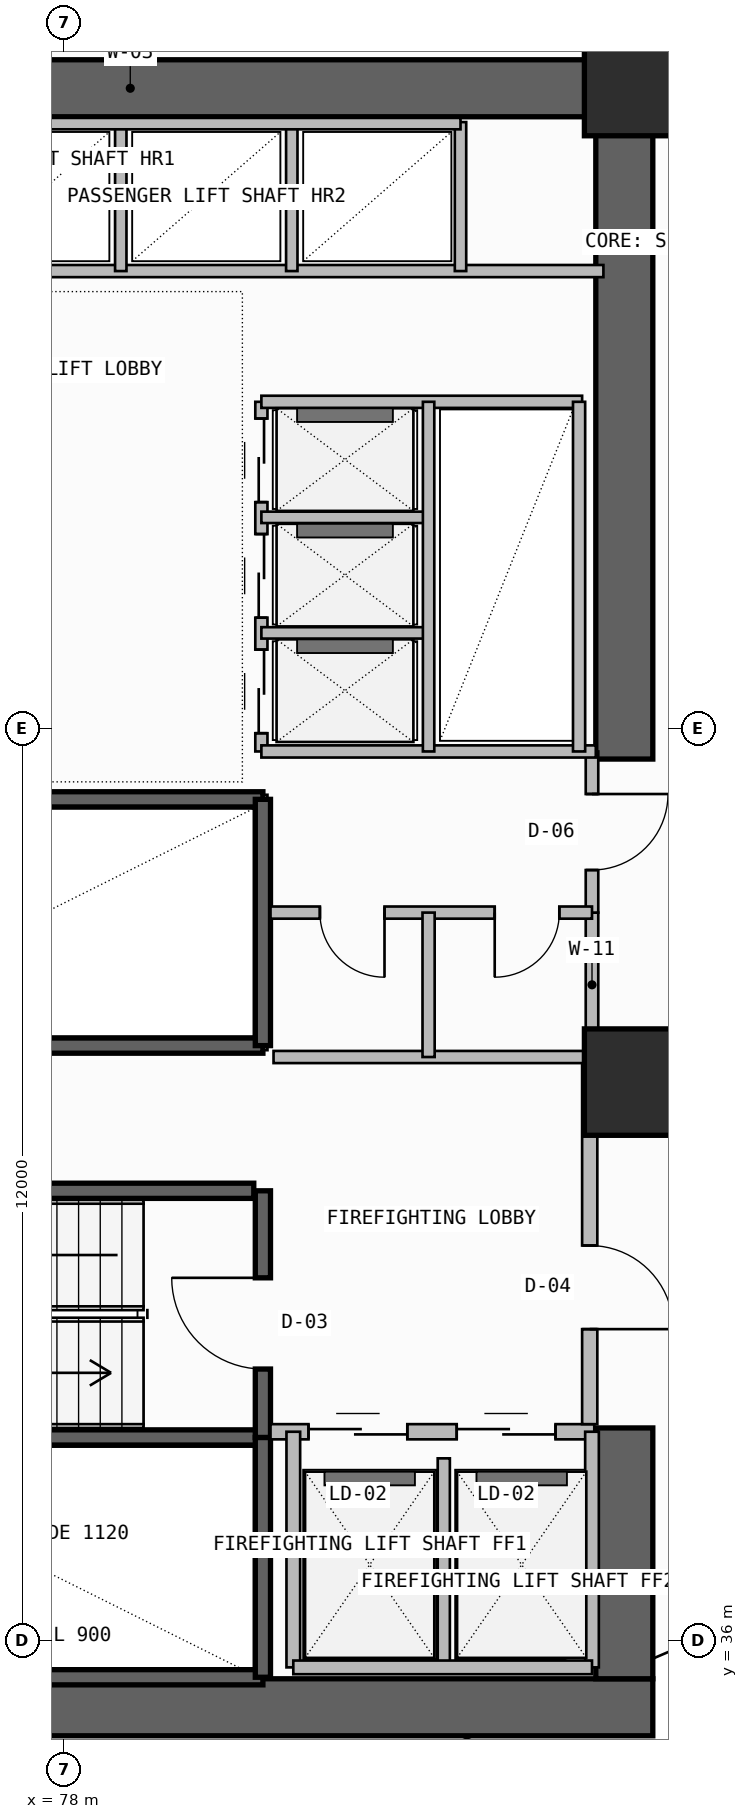
"""IFC4 building model, lengths in metres.
Left out: names, types, materials, properties, quantities, classifications, styles, units other than length and angle.
Written with IfcOpenShell. Run it as: python <this file> out.ifc"""

import sys

from ifc_helpers import new_model, si_unit, direction, frame, frame_2d, origin, origin_2d, place, context, subcontext, project, spatial, rectangle, extrude, element, fill, save


model = new_model("IFC4")
c1 = context("Model", 3, precision=1e-05, world=origin(), true_north=direction((0.0, 1.0)))
c2 = subcontext(c1, "Body", "Model", "MODEL_VIEW")
j1 = project(units=[si_unit("LENGTHUNIT", "METRE"), si_unit("PLANEANGLEUNIT", "RADIAN")], contexts=[c1])
p1 = place(None, origin())
s1 = spatial("IfcSite", under=j1, at=p1, CompositionType="ELEMENT")
p2 = place(p1, origin())
s2 = spatial("IfcBuilding", under=s1, at=p2, CompositionType="ELEMENT")
p3 = place(p2, frame((0.0, 0.0, 175.5)))
s3 = spatial("IfcBuildingStorey", under=s2, at=p3, CompositionType="ELEMENT", Elevation=175.5)
p4 = place(p3, frame((72.15, 35.125, -0.26), z_axis=(0.0, 0.0, 1.0), x_axis=(1.0, 0.0, 0.0)))
e1 = element("IfcWall", 1, at=p4, inside=s3, PredefinedType="SHEAR", context=c2, shape_type="SweptSolid", body=[
    extrude(rectangle(XDim=13.6, YDim=0.75, at=frame_2d((6.8, 0.0))), origin(), (0.0, 0.0, 1.0), 3.6),
])
p5 = place(p3, frame((85.375, 35.5, -0.26), z_axis=(0.0, 0.0, 1.0), x_axis=(0.0, 1.0, 0.0)))
e2 = element("IfcWall", 2, at=p5, inside=s3, PredefinedType="SHEAR", context=c2, shape_type="SweptSolid", body=[
    extrude(rectangle(XDim=3.3, YDim=0.75, at=frame_2d((1.65, 0.0))), origin(), (0.0, 0.0, 1.0), 3.6),
])
p6 = place(p3, frame((72.0, 56.425, -0.26), z_axis=(0.0, 0.0, 1.0), x_axis=(1.0, 0.0, 0.0)))
e3 = element("IfcWall", 3, at=p6, inside=s3, PredefinedType="SHEAR", context=c2, shape_type="SweptSolid", body=[
    extrude(rectangle(XDim=13.75, YDim=0.75, at=frame_2d((6.875, 0.0))), origin(), (0.0, 0.0, 1.0), 3.6),
])
p7 = place(p3, frame((85.375, 47.6, -0.26), z_axis=(0.0, 0.0, 1.0), x_axis=(0.0, 1.0, 0.0)))
e4 = element("IfcWall", 4, at=p7, inside=s3, PredefinedType="SHEAR", context=c2, shape_type="SweptSolid", body=[
    extrude(rectangle(XDim=8.45, YDim=0.75, at=frame_2d((4.225, 0.0))), origin(), (0.0, 0.0, 1.0), 3.6),
])
for number, where, z_axis, x_axis in (
    (5, (85.55, 43.35, 0.0), (0.0, 0.0, 1.0), (1.0, 0.0, 0.0)),
    (6, (85.55, 56.5, 0.0), (0.0, 0.0, 1.0), (1.0, 0.0, 0.0)),
):
    element("IfcColumn", number, at=place(p3, frame(where, z_axis=z_axis, x_axis=x_axis)), inside=s3, PredefinedType="COLUMN", context=c2, shape_type="SweptSolid", body=[
        extrude(rectangle(XDim=1.4, YDim=1.4, at=origin_2d()), origin(), (0.0, 0.0, 1.0), 3.6),
    ])
for number, where, z_axis, x_axis in (
    (7, (72.92, 35.52, -0.26), (0.0, 0.0, 1.0), (1.0, 0.0, 0.0)),
    (8, (72.92, 38.675, -0.26), (0.0, 0.0, 1.0), (1.0, 0.0, 0.0)),
):
    element("IfcWall", number, at=place(p3, frame(where, z_axis=z_axis, x_axis=x_axis)), inside=s3, PredefinedType="SOLIDWALL", context=c2, shape_type="SweptSolid", body=[
        extrude(rectangle(XDim=7.7, YDim=0.2, at=frame_2d((3.85, 0.0))), origin(), (0.0, 0.0, 1.0), 3.6),
    ])
p8 = place(p3, frame((80.62, 35.52, -0.26), z_axis=(0.0, 0.0, 1.0), x_axis=(0.0, 1.0, 0.0)))
e9 = element("IfcWall", 9, at=p8, inside=s3, PredefinedType="SOLIDWALL", context=c2, shape_type="SweptSolid", body=[
    extrude(rectangle(XDim=3.155, YDim=0.2, at=frame_2d((1.578, 0.0))), origin(), (0.0, 0.0, 1.0), 3.6),
])
p9 = place(p3, frame((80.62, 38.675, -0.26), z_axis=(0.0, 0.0, 1.0), x_axis=(0.0, 1.0, 0.0)))
e10 = element("IfcWall", 10, at=p9, inside=s3, PredefinedType="SOLIDWALL", context=c2, shape_type="SweptSolid", body=[
    extrude(rectangle(XDim=3.245, YDim=0.2, at=frame_2d((1.623, 0.0))), origin(), (0.0, 0.0, 1.0), 3.6),
])
p10 = place(p9, frame((0.9, 0.0, 0.26)))
e11 = element("IfcOpeningElement", 11, at=p10, cuts=e10, PredefinedType="OPENING", context=c2, shape_type="SweptSolid", body=[
    extrude(rectangle(XDim=1.2, YDim=2.2, at=frame_2d((0.6, 1.1))), frame((0.0, 0.11, 0.0), z_axis=(0.0, -1.0, 0.0), x_axis=(1.0, 0.0, 0.0)), (0.0, 0.0, 1.0), 0.22),
])
p11 = place(p3, frame((80.72, 38.75, 0.0), z_axis=(0.0, 0.0, 1.0), x_axis=(1.0, 0.0, 0.0)))
e12 = element("IfcWall", 12, at=p11, inside=s3, PredefinedType="SOLIDWALL", context=c2, shape_type="SweptSolid", body=[
    extrude(rectangle(XDim=4.26, YDim=0.2, at=frame_2d((2.13, 0.0))), origin(), (0.0, 0.0, 1.0), 3.34),
])
p12 = place(p11, frame((0.5, 0.0, 0.0)))
e13 = element("IfcOpeningElement", 13, at=p12, cuts=e12, PredefinedType="OPENING", context=c2, shape_type="SweptSolid", body=[
    extrude(rectangle(XDim=1.3, YDim=2.3, at=frame_2d((0.65, 1.15))), frame((0.0, 0.11, 0.0), z_axis=(0.0, -1.0, 0.0), x_axis=(1.0, 0.0, 0.0)), (0.0, 0.0, 1.0), 0.22),
])
p13 = place(p11, frame((2.45, 0.0, 0.0)))
e14 = element("IfcOpeningElement", 14, at=p13, cuts=e12, PredefinedType="OPENING", context=c2, shape_type="SweptSolid", body=[
    extrude(rectangle(XDim=1.3, YDim=2.3, at=frame_2d((0.65, 1.15))), frame((0.0, 0.11, 0.0), z_axis=(0.0, -1.0, 0.0), x_axis=(1.0, 0.0, 0.0)), (0.0, 0.0, 1.0), 0.22),
])
p14 = place(p3, frame((83.0, 35.65, 0.0), z_axis=(0.0, 0.0, 1.0), x_axis=(0.0, 1.0, 0.0)))
e15 = element("IfcWall", 15, at=p14, inside=s3, PredefinedType="PLUMBINGWALL", context=c2, shape_type="SweptSolid", body=[
    extrude(rectangle(XDim=2.75, YDim=0.16, at=frame_2d((1.375, 0.0))), origin(), (0.0, 0.0, 1.0), 3.34),
])
for number, where, z_axis, x_axis in (
    (16, (84.95, 35.65, 0.0), (0.0, 0.0, 1.0), (0.0, 1.0, 0.0)),
    (17, (81.02, 35.65, 0.0), (0.0, 0.0, 1.0), (0.0, 1.0, 0.0)),
):
    element("IfcWall", number, at=place(p3, frame(where, z_axis=z_axis, x_axis=x_axis)), inside=s3, PredefinedType="SOLIDWALL", context=c2, shape_type="SweptSolid", body=[
        extrude(rectangle(XDim=3.1, YDim=0.18, at=frame_2d((1.55, 0.0))), origin(), (0.0, 0.0, 1.0), 3.34),
    ])
p15 = place(p3, frame((81.02, 35.65, 0.0), z_axis=(0.0, 0.0, 1.0), x_axis=(1.0, 0.0, 0.0)))
e18 = element("IfcWall", 18, at=p15, inside=s3, PredefinedType="SOLIDWALL", context=c2, shape_type="SweptSolid", body=[
    extrude(rectangle(XDim=3.93, YDim=0.18, at=frame_2d((1.965, 0.0))), origin(), (0.0, 0.0, 1.0), 3.34),
])
p16 = place(p3, frame((84.92, 38.85, 0.0), z_axis=(0.0, 0.0, 1.0), x_axis=(0.0, 1.0, 0.0)))
e19 = element("IfcWall", 19, at=p16, inside=s3, PredefinedType="SOLIDWALL", context=c2, shape_type="SweptSolid", body=[
    extrude(rectangle(XDim=4.83, YDim=0.2, at=frame_2d((2.415, 0.0))), origin(), (0.0, 0.0, 1.0), 3.34),
])
p17 = place(p16, frame((1.25, 0.0, 0.0)))
e20 = element("IfcOpeningElement", 20, at=p17, cuts=e19, PredefinedType="OPENING", context=c2, shape_type="SweptSolid", body=[
    extrude(rectangle(XDim=1.1, YDim=2.2, at=frame_2d((0.55, 1.1))), frame((0.0, 0.11, 0.0), z_axis=(0.0, -1.0, 0.0), x_axis=(1.0, 0.0, 0.0)), (0.0, 0.0, 1.0), 0.22),
])
p18 = place(p3, frame((72.92, 41.92, -0.26), z_axis=(0.0, 0.0, 1.0), x_axis=(1.0, 0.0, 0.0)))
e21 = element("IfcWall", 21, at=p18, inside=s3, PredefinedType="SOLIDWALL", context=c2, shape_type="SweptSolid", body=[
    extrude(rectangle(XDim=7.58, YDim=0.2, at=frame_2d((3.79, 0.0))), origin(), (0.0, 0.0, 1.0), 3.6),
])
for number, where, z_axis, x_axis in (
    (22, (72.92, 43.83, -0.26), (0.0, 0.0, 1.0), (1.0, 0.0, 0.0)),
    (23, (72.92, 47.07, -0.26), (0.0, 0.0, 1.0), (1.0, 0.0, 0.0)),
):
    element("IfcWall", number, at=place(p3, frame(where, z_axis=z_axis, x_axis=x_axis)), inside=s3, PredefinedType="SOLIDWALL", context=c2, shape_type="SweptSolid", body=[
        extrude(rectangle(XDim=7.7, YDim=0.2, at=frame_2d((3.85, 0.0))), origin(), (0.0, 0.0, 1.0), 3.6),
    ])
p19 = place(p3, frame((80.62, 43.83, -0.26), z_axis=(0.0, 0.0, 1.0), x_axis=(0.0, 1.0, 0.0)))
e24 = element("IfcWall", 24, at=p19, inside=s3, PredefinedType="SOLIDWALL", context=c2, shape_type="SweptSolid", body=[
    extrude(rectangle(XDim=3.24, YDim=0.2, at=frame_2d((1.62, 0.0))), origin(), (0.0, 0.0, 1.0), 3.6),
])
p20 = place(p3, frame((84.95, 43.68, 0.0), z_axis=(0.0, 0.0, 1.0), x_axis=(0.0, 1.0, 0.0)))
e25 = element("IfcWall", 25, at=p20, inside=s3, PredefinedType="PLUMBINGWALL", context=c2, shape_type="SweptSolid", body=[
    extrude(rectangle(XDim=1.9, YDim=0.165, at=frame_2d((0.95, 0.0))), origin(), (0.0, 0.0, 1.0), 3.34),
])
p21 = place(p3, frame((84.95, 45.58, 0.0), z_axis=(0.0, 0.0, 1.0), x_axis=(0.0, 1.0, 0.0)))
e26 = element("IfcWall", 26, at=p21, inside=s3, PredefinedType="PARTITIONING", context=c2, shape_type="SweptSolid", body=[
    extrude(rectangle(XDim=2.12, YDim=0.165, at=frame_2d((1.06, 0.0))), origin(), (0.0, 0.0, 1.0), 3.34),
])
p22 = place(p21, frame((0.56, 0.0, 0.0)))
e27 = element("IfcOpeningElement", 27, at=p22, cuts=e26, PredefinedType="OPENING", context=c2, shape_type="SweptSolid", body=[
    extrude(rectangle(XDim=1.0, YDim=2.2, at=frame_2d((0.5, 1.1))), frame((0.0, 0.093, 0.0), z_axis=(0.0, -1.0, 0.0), x_axis=(1.0, 0.0, 0.0)), (0.0, 0.0, 1.0), 0.185),
])
p23 = place(p3, frame((80.72, 45.58, 0.0), z_axis=(0.0, 0.0, 1.0), x_axis=(1.0, 0.0, 0.0)))
e28 = element("IfcWall", 28, at=p23, inside=s3, PredefinedType="PLUMBINGWALL", context=c2, shape_type="SweptSolid", body=[
    extrude(rectangle(XDim=4.23, YDim=0.16, at=frame_2d((2.115, 0.0))), origin(), (0.0, 0.0, 1.0), 3.34),
])
p24 = place(p23, frame((0.65, 0.0, 0.0)))
e29 = element("IfcOpeningElement", 29, at=p24, cuts=e28, PredefinedType="OPENING", context=c2, shape_type="SweptSolid", body=[
    extrude(rectangle(XDim=0.85, YDim=2.05, at=frame_2d((0.425, 1.025))), frame((0.0, 0.09, 0.0), z_axis=(0.0, -1.0, 0.0), x_axis=(1.0, 0.0, 0.0)), (0.0, 0.0, 1.0), 0.18),
])
p25 = place(p23, frame((2.95, 0.0, 0.0)))
e30 = element("IfcOpeningElement", 30, at=p25, cuts=e28, PredefinedType="OPENING", context=c2, shape_type="SweptSolid", body=[
    extrude(rectangle(XDim=0.85, YDim=2.05, at=frame_2d((0.425, 1.025))), frame((0.0, 0.09, 0.0), z_axis=(0.0, -1.0, 0.0), x_axis=(1.0, 0.0, 0.0)), (0.0, 0.0, 1.0), 0.18),
])
p26 = place(p3, frame((80.76, 43.68, 0.0), z_axis=(0.0, 0.0, 1.0), x_axis=(1.0, 0.0, 0.0)))
e31 = element("IfcWall", 31, at=p26, inside=s3, PredefinedType="PLUMBINGWALL", context=c2, shape_type="SweptSolid", body=[
    extrude(rectangle(XDim=4.19, YDim=0.16, at=frame_2d((2.095, 0.0))), origin(), (0.0, 0.0, 1.0), 3.34),
])
p27 = place(p3, frame((82.8, 43.68, 0.0), z_axis=(0.0, 0.0, 1.0), x_axis=(0.0, 1.0, 0.0)))
e32 = element("IfcWall", 32, at=p27, inside=s3, PredefinedType="PLUMBINGWALL", context=c2, shape_type="SweptSolid", body=[
    extrude(rectangle(XDim=1.9, YDim=0.16, at=frame_2d((0.95, 0.0))), origin(), (0.0, 0.0, 1.0), 3.34),
])
p28 = place(p3, frame((80.6, 47.7, 0.0), z_axis=(0.0, 0.0, 1.0), x_axis=(0.0, 1.0, 0.0)))
e33 = element("IfcWall", 33, at=p28, inside=s3, PredefinedType="SOLIDWALL", context=c2, shape_type="SweptSolid", body=[
    extrude(rectangle(XDim=4.6, YDim=0.16, at=frame_2d((2.3, 0.0))), origin(), (0.0, 0.0, 1.0), 3.34),
])
p29 = place(p28, frame((0.24, 0.0, 0.0)))
e34 = element("IfcOpeningElement", 34, at=p29, cuts=e33, PredefinedType="OPENING", context=c2, shape_type="SweptSolid", body=[
    extrude(rectangle(XDim=1.1, YDim=2.25, at=frame_2d((0.55, 1.125))), frame((0.0, 0.09, 0.0), z_axis=(0.0, -1.0, 0.0), x_axis=(1.0, 0.0, 0.0)), (0.0, 0.0, 1.0), 0.18),
])
p30 = place(p28, frame((1.76, 0.0, 0.0)))
e35 = element("IfcOpeningElement", 35, at=p30, cuts=e33, PredefinedType="OPENING", context=c2, shape_type="SweptSolid", body=[
    extrude(rectangle(XDim=1.1, YDim=2.25, at=frame_2d((0.55, 1.125))), frame((0.0, 0.09, 0.0), z_axis=(0.0, -1.0, 0.0), x_axis=(1.0, 0.0, 0.0)), (0.0, 0.0, 1.0), 0.18),
])
p31 = place(p28, frame((3.28, 0.0, 0.0)))
e36 = element("IfcOpeningElement", 36, at=p31, cuts=e33, PredefinedType="OPENING", context=c2, shape_type="SweptSolid", body=[
    extrude(rectangle(XDim=1.1, YDim=2.25, at=frame_2d((0.55, 1.125))), frame((0.0, 0.09, 0.0), z_axis=(0.0, -1.0, 0.0), x_axis=(1.0, 0.0, 0.0)), (0.0, 0.0, 1.0), 0.18),
])
p32 = place(p3, frame((80.6, 47.7, 0.0), z_axis=(0.0, 0.0, 1.0), x_axis=(1.0, 0.0, 0.0)))
e37 = element("IfcWall", 37, at=p32, inside=s3, PredefinedType="SOLIDWALL", context=c2, shape_type="SweptSolid", body=[
    extrude(rectangle(XDim=4.4, YDim=0.16, at=frame_2d((2.2, 0.0))), origin(), (0.0, 0.0, 1.0), 3.34),
])
p33 = place(p3, frame((80.6, 52.3, 0.0), z_axis=(0.0, 0.0, 1.0), x_axis=(1.0, 0.0, 0.0)))
e38 = element("IfcWall", 38, at=p33, inside=s3, PredefinedType="SOLIDWALL", context=c2, shape_type="SweptSolid", body=[
    extrude(rectangle(XDim=4.22, YDim=0.16, at=frame_2d((2.11, 0.0))), origin(), (0.0, 0.0, 1.0), 3.34),
])
for number, where, z_axis, x_axis in (
    (39, (80.6, 49.26, 0.0), (0.0, 0.0, 1.0), (1.0, 0.0, 0.0)),
    (40, (80.6, 50.78, 0.0), (0.0, 0.0, 1.0), (1.0, 0.0, 0.0)),
):
    element("IfcWall", number, at=place(p3, frame(where, z_axis=z_axis, x_axis=x_axis)), inside=s3, PredefinedType="PLUMBINGWALL", context=c2, shape_type="SweptSolid", body=[
        extrude(rectangle(XDim=2.2, YDim=0.15, at=frame_2d((1.1, 0.0))), origin(), (0.0, 0.0, 1.0), 3.34),
    ])
p34 = place(p3, frame((82.8, 47.7, 0.0), z_axis=(0.0, 0.0, 1.0), x_axis=(0.0, 1.0, 0.0)))
e41 = element("IfcWall", 41, at=p34, inside=s3, PredefinedType="PLUMBINGWALL", context=c2, shape_type="SweptSolid", body=[
    extrude(rectangle(XDim=4.6, YDim=0.15, at=frame_2d((2.3, 0.0))), origin(), (0.0, 0.0, 1.0), 3.34),
])
p35 = place(p3, frame((84.78, 47.7, 0.0), z_axis=(0.0, 0.0, 1.0), x_axis=(0.0, 1.0, 0.0)))
e42 = element("IfcWall", 42, at=p35, inside=s3, PredefinedType="SOLIDWALL", context=c2, shape_type="SweptSolid", body=[
    extrude(rectangle(XDim=4.6, YDim=0.16, at=frame_2d((2.3, 0.0))), origin(), (0.0, 0.0, 1.0), 3.34),
])
p36 = place(p3, frame((73.02, 54.02, 0.0), z_axis=(0.0, 0.0, 1.0), x_axis=(1.0, 0.0, 0.0)))
e43 = element("IfcWall", 43, at=p36, inside=s3, PredefinedType="SOLIDWALL", context=c2, shape_type="SweptSolid", body=[
    extrude(rectangle(XDim=12.08, YDim=0.16, at=frame_2d((6.04, 0.0))), origin(), (0.0, 0.0, 1.0), 3.34),
])
for number, where, z_axis, x_axis in (
    (44, (78.75, 54.02, 0.0), (0.0, 0.0, 1.0), (0.0, 1.0, 0.0)),
    (45, (81.0, 54.02, 0.0), (0.0, 0.0, 1.0), (0.0, 1.0, 0.0)),
):
    element("IfcWall", number, at=place(p3, frame(where, z_axis=z_axis, x_axis=x_axis)), inside=s3, PredefinedType="PLUMBINGWALL", context=c2, shape_type="SweptSolid", body=[
        extrude(rectangle(XDim=1.96, YDim=0.15, at=frame_2d((0.98, 0.0))), origin(), (0.0, 0.0, 1.0), 3.34),
    ])
p37 = place(p3, frame((83.22, 54.02, 0.0), z_axis=(0.0, 0.0, 1.0), x_axis=(0.0, 1.0, 0.0)))
e46 = element("IfcWall", 46, at=p37, inside=s3, PredefinedType="SOLIDWALL", context=c2, shape_type="SweptSolid", body=[
    extrude(rectangle(XDim=1.96, YDim=0.15, at=frame_2d((0.98, 0.0))), origin(), (0.0, 0.0, 1.0), 3.34),
])
p38 = place(p3, frame((76.52, 55.96, 0.0), z_axis=(0.0, 0.0, 1.0), x_axis=(1.0, 0.0, 0.0)))
e47 = element("IfcWall", 47, at=p38, inside=s3, PredefinedType="SOLIDWALL", context=c2, shape_type="SweptSolid", body=[
    extrude(rectangle(XDim=6.7, YDim=0.15, at=frame_2d((3.35, 0.0))), origin(), (0.0, 0.0, 1.0), 3.34),
])
p39 = place(p10, origin())
e48 = element("IfcDoor", 48, at=p39, inside=s3, OperationType="SINGLE_SWING_RIGHT", PredefinedType="USERDEFINED", context=c2, shape_type="SweptSolid", body=[
    extrude(rectangle(XDim=1.2, YDim=2.2, at=frame_2d((0.6, 1.1))), frame((0.0, 0.025, 0.0), z_axis=(0.0, -1.0, 0.0), x_axis=(1.0, 0.0, 0.0)), (0.0, 0.0, 1.0), 0.05),
])
fill(e11, e48)
p40 = place(p12, origin())
e49 = element("IfcDoor", 49, at=p40, inside=s3, OperationType="DOUBLE_DOOR_SLIDING", PredefinedType="DOOR", context=c2, shape_type="SweptSolid", body=[
    extrude(rectangle(XDim=1.3, YDim=2.3, at=frame_2d((0.65, 1.15))), frame((0.0, 0.025, 0.0), z_axis=(0.0, -1.0, 0.0), x_axis=(1.0, 0.0, 0.0)), (0.0, 0.0, 1.0), 0.05),
])
fill(e13, e49)
p41 = place(p13, origin())
e50 = element("IfcDoor", 50, at=p41, inside=s3, OperationType="DOUBLE_DOOR_SLIDING", PredefinedType="DOOR", context=c2, shape_type="SweptSolid", body=[
    extrude(rectangle(XDim=1.3, YDim=2.3, at=frame_2d((0.65, 1.15))), frame((0.0, 0.025, 0.0), z_axis=(0.0, -1.0, 0.0), x_axis=(1.0, 0.0, 0.0)), (0.0, 0.0, 1.0), 0.05),
])
fill(e14, e50)
p42 = place(p17, frame((1.1, 0.0, 0.0), z_axis=(0.0, 0.0, 1.0), x_axis=(-1.0, 0.0, 0.0)))
e51 = element("IfcDoor", 51, at=p42, inside=s3, OperationType="SINGLE_SWING_RIGHT", PredefinedType="DOOR", context=c2, shape_type="SweptSolid", body=[
    extrude(rectangle(XDim=1.1, YDim=2.2, at=frame_2d((0.55, 1.1))), frame((0.0, 0.025, 0.0), z_axis=(0.0, -1.0, 0.0), x_axis=(1.0, 0.0, 0.0)), (0.0, 0.0, 1.0), 0.05),
])
fill(e20, e51)
p43 = place(p22, frame((1.0, 0.0, 0.0), z_axis=(0.0, 0.0, 1.0), x_axis=(-1.0, 0.0, 0.0)))
e52 = element("IfcDoor", 52, at=p43, inside=s3, OperationType="SINGLE_SWING_LEFT", PredefinedType="DOOR", context=c2, shape_type="SweptSolid", body=[
    extrude(rectangle(XDim=1.0, YDim=2.2, at=frame_2d((0.5, 1.1))), frame((0.0, 0.025, 0.0), z_axis=(0.0, -1.0, 0.0), x_axis=(1.0, 0.0, 0.0)), (0.0, 0.0, 1.0), 0.05),
])
fill(e27, e52)
p44 = place(p24, frame((0.85, 0.0, 0.0), z_axis=(0.0, 0.0, 1.0), x_axis=(-1.0, 0.0, 0.0)))
e53 = element("IfcDoor", 53, at=p44, inside=s3, OperationType="SINGLE_SWING_LEFT", PredefinedType="DOOR", context=c2, shape_type="SweptSolid", body=[
    extrude(rectangle(XDim=0.85, YDim=2.05, at=frame_2d((0.425, 1.025))), frame((0.0, 0.025, 0.0), z_axis=(0.0, -1.0, 0.0), x_axis=(1.0, 0.0, 0.0)), (0.0, 0.0, 1.0), 0.05),
])
fill(e29, e53)
p45 = place(p25, frame((0.85, 0.0, 0.0), z_axis=(0.0, 0.0, 1.0), x_axis=(-1.0, 0.0, 0.0)))
e54 = element("IfcDoor", 54, at=p45, inside=s3, OperationType="SINGLE_SWING_RIGHT", PredefinedType="DOOR", context=c2, shape_type="SweptSolid", body=[
    extrude(rectangle(XDim=0.85, YDim=2.05, at=frame_2d((0.425, 1.025))), frame((0.0, 0.025, 0.0), z_axis=(0.0, -1.0, 0.0), x_axis=(1.0, 0.0, 0.0)), (0.0, 0.0, 1.0), 0.05),
])
fill(e30, e54)
p46 = place(p29, frame((1.1, 0.0, 0.0), z_axis=(0.0, 0.0, 1.0), x_axis=(-1.0, 0.0, 0.0)))
e55 = element("IfcDoor", 55, at=p46, inside=s3, OperationType="DOUBLE_DOOR_SLIDING", PredefinedType="DOOR", context=c2, shape_type="SweptSolid", body=[
    extrude(rectangle(XDim=1.1, YDim=2.25, at=frame_2d((0.55, 1.125))), frame((0.0, 0.025, 0.0), z_axis=(0.0, -1.0, 0.0), x_axis=(1.0, 0.0, 0.0)), (0.0, 0.0, 1.0), 0.05),
])
fill(e34, e55)
p47 = place(p30, frame((1.1, 0.0, 0.0), z_axis=(0.0, 0.0, 1.0), x_axis=(-1.0, 0.0, 0.0)))
e56 = element("IfcDoor", 56, at=p47, inside=s3, OperationType="DOUBLE_DOOR_SLIDING", PredefinedType="DOOR", context=c2, shape_type="SweptSolid", body=[
    extrude(rectangle(XDim=1.1, YDim=2.25, at=frame_2d((0.55, 1.125))), frame((0.0, 0.025, 0.0), z_axis=(0.0, -1.0, 0.0), x_axis=(1.0, 0.0, 0.0)), (0.0, 0.0, 1.0), 0.05),
])
fill(e35, e56)
p48 = place(p31, frame((1.1, 0.0, 0.0), z_axis=(0.0, 0.0, 1.0), x_axis=(-1.0, 0.0, 0.0)))
e57 = element("IfcDoor", 57, at=p48, inside=s3, OperationType="DOUBLE_DOOR_SLIDING", PredefinedType="DOOR", context=c2, shape_type="SweptSolid", body=[
    extrude(rectangle(XDim=1.1, YDim=2.25, at=frame_2d((0.55, 1.125))), frame((0.0, 0.025, 0.0), z_axis=(0.0, -1.0, 0.0), x_axis=(1.0, 0.0, 0.0)), (0.0, 0.0, 1.0), 0.05),
])
fill(e36, e57)
save(model, sys.argv[1])
